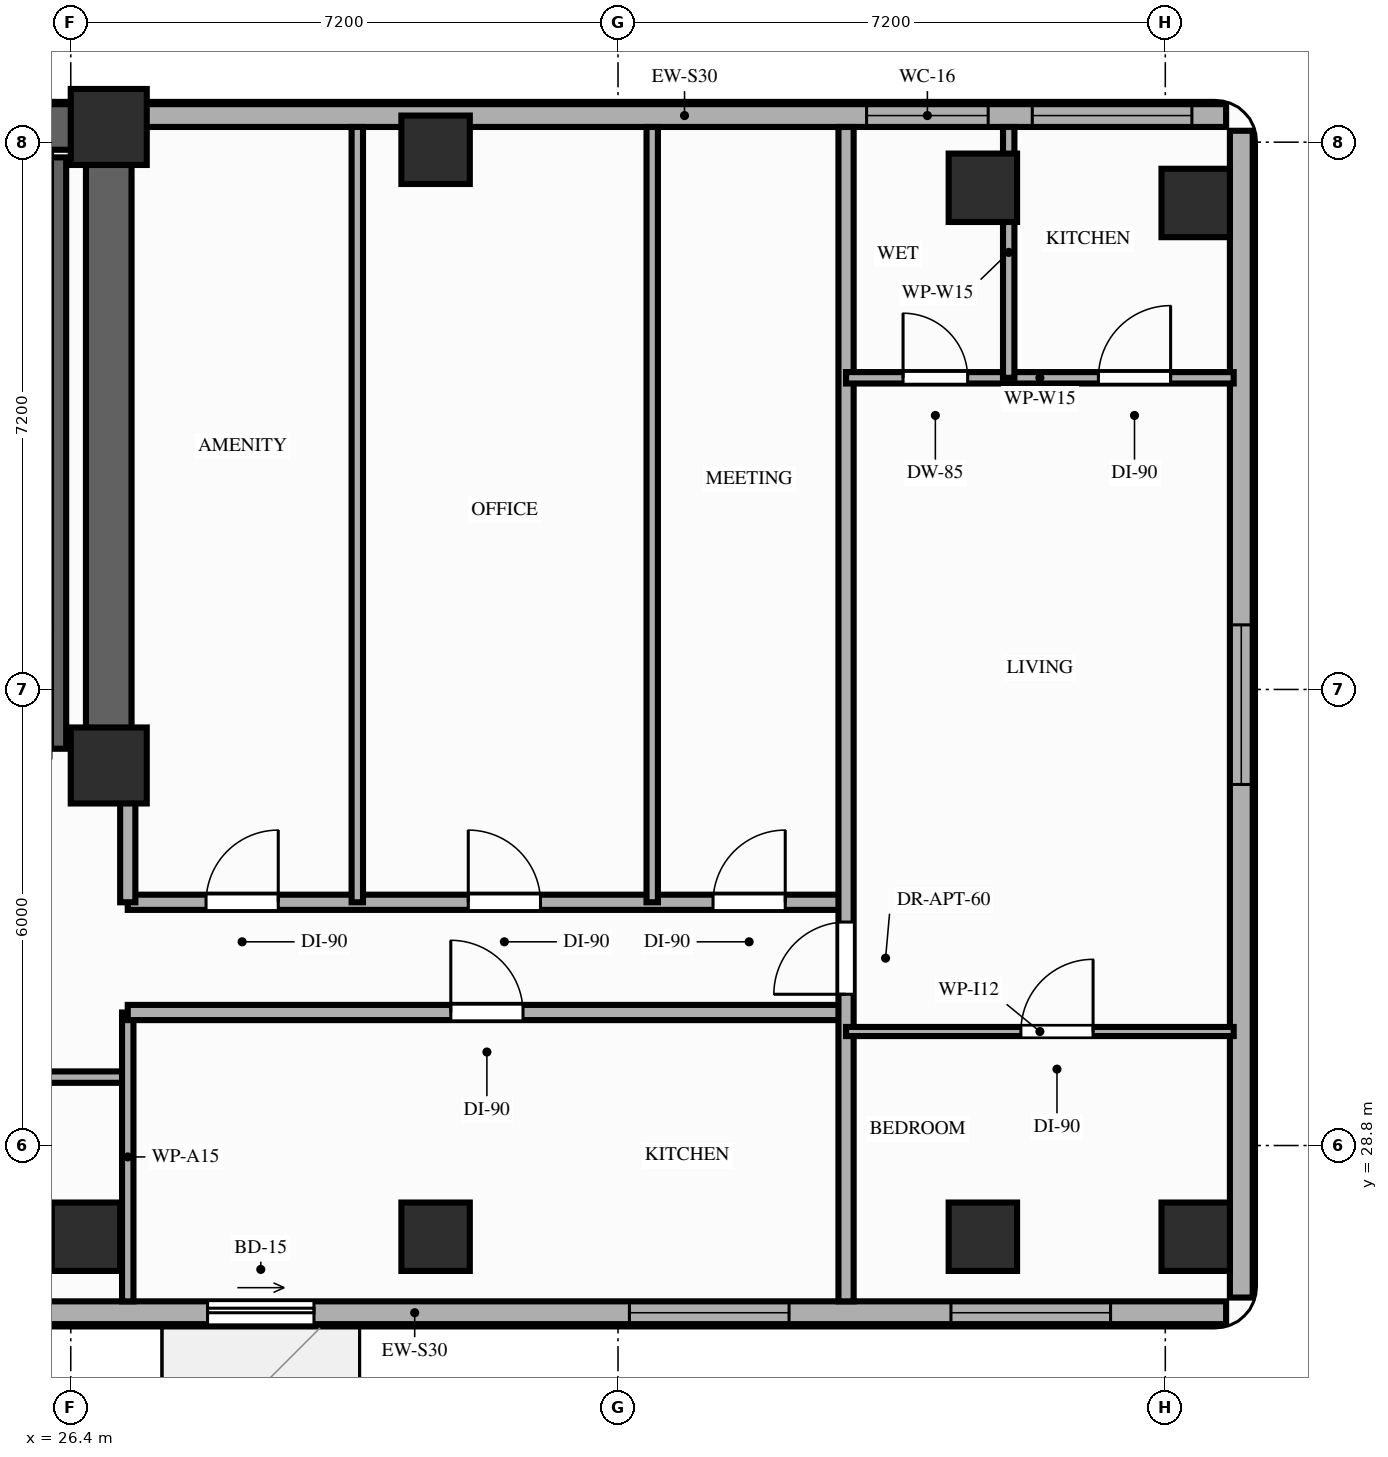
"""IFC4 building model, lengths in metres.
Left out: names, types, materials, properties, quantities, classifications, styles, units other than length and angle.
Written with IfcOpenShell. Run it as: python <this file> out.ifc"""

import sys

from ifc_helpers import new_model, si_unit, direction, frame, frame_2d, origin, origin_2d, place, context, subcontext, project, spatial, rectangle, extrude, element, fill, save


model = new_model("IFC4")
c1 = context("Model", 3, precision=1e-05, world=origin(), true_north=direction((0.0, 1.0)))
c2 = subcontext(c1, "Body", "Model", "MODEL_VIEW")
j1 = project(units=[si_unit("LENGTHUNIT", "METRE"), si_unit("PLANEANGLEUNIT", "RADIAN")], contexts=[c1])
p1 = place(None, origin())
s1 = spatial("IfcSite", under=j1, at=p1, CompositionType="ELEMENT")
p2 = place(p1, origin())
s2 = spatial("IfcBuilding", under=s1, at=p2, CompositionType="ELEMENT")
p3 = place(p2, frame((0.0, 0.0, 179.2)))
s3 = spatial("IfcBuildingStorey", under=s2, at=p3, CompositionType="ELEMENT", Elevation=179.2)
for number, where, z_axis, x_axis in (
    (1, (26.9, 33.8, 0.0), (0.0, 0.0, 1.0), (1.0, 0.0, 0.0)),
    (2, (26.9, 42.2, 0.0), (0.0, 0.0, 1.0), (1.0, 0.0, 0.0)),
):
    element("IfcColumn", number, at=place(p3, frame(where, z_axis=z_axis, x_axis=x_axis)), inside=s3, PredefinedType="COLUMN", context=c2, shape_type="SweptSolid", body=[
        extrude(rectangle(XDim=1.0, YDim=1.0, at=origin_2d()), origin(), (0.0, 0.0, 1.0), 3.2),
    ])
for number, where, z_axis, x_axis in (
    (3, (26.6, 27.6, 0.0), (0.0, 0.0, 1.0), (1.0, 0.0, 0.0)),
    (4, (31.2, 27.6, 0.0), (0.0, 0.0, 1.0), (1.0, 0.0, 0.0)),
    (5, (31.2, 41.9, 0.0), (0.0, 0.0, 1.0), (1.0, 0.0, 0.0)),
    (6, (38.4, 27.6, 0.0), (0.0, 0.0, 1.0), (1.0, 0.0, 0.0)),
    (7, (38.4, 41.4, 0.0), (0.0, 0.0, 1.0), (1.0, 0.0, 0.0)),
    (8, (41.2, 27.6, 0.0), (0.0, 0.0, 1.0), (1.0, 0.0, 0.0)),
    (9, (41.2, 41.2, 0.0), (0.0, 0.0, 1.0), (1.0, 0.0, 0.0)),
):
    element("IfcColumn", number, at=place(p3, frame(where, z_axis=z_axis, x_axis=x_axis)), inside=s3, PredefinedType="COLUMN", context=c2, shape_type="SweptSolid", body=[
        extrude(rectangle(XDim=0.9, YDim=0.9, at=origin_2d()), origin(), (0.0, 0.0, 1.0), 3.2),
    ])
p4 = place(p3, frame((41.6, 42.35, 0.0), z_axis=(0.0, 0.0, 1.0), x_axis=(-1.0, 0.0, 0.0)))
e10 = element("IfcWall", 10, at=p4, inside=s3, PredefinedType="STANDARD", context=c2, shape_type="SweptSolid", body=[
    extrude(rectangle(XDim=14.25, YDim=0.3, at=frame_2d((7.125, 0.0))), origin(), (0.0, 0.0, 1.0), 2.45),
])
p5 = place(p4, frame((3.13, 0.0, 0.85)))
e11 = element("IfcOpeningElement", 11, at=p5, cuts=e10, PredefinedType="OPENING", context=c2, shape_type="SweptSolid", body=[
    extrude(rectangle(XDim=1.6, YDim=1.35, at=frame_2d((0.8, 0.675))), frame((0.0, 0.16, 0.0), z_axis=(0.0, -1.0, 0.0), x_axis=(1.0, 0.0, 0.0)), (0.0, 0.0, 1.0), 0.32),
])
p6 = place(p4, frame((0.45, 0.0, 0.85)))
e12 = element("IfcOpeningElement", 12, at=p6, cuts=e10, PredefinedType="OPENING", context=c2, shape_type="SweptSolid", body=[
    extrude(rectangle(XDim=2.1, YDim=1.35, at=frame_2d((1.05, 0.675))), frame((0.0, 0.16, 0.0), z_axis=(0.0, -1.0, 0.0), x_axis=(1.0, 0.0, 0.0)), (0.0, 0.0, 1.0), 0.32),
])
p7 = place(p3, frame((20.25, 26.6, 0.0), z_axis=(0.0, 0.0, 1.0), x_axis=(1.0, 0.0, 0.0)))
e13 = element("IfcWall", 13, at=p7, inside=s3, PredefinedType="STANDARD", context=c2, shape_type="SweptSolid", body=[
    extrude(rectangle(XDim=21.35, YDim=0.3, at=frame_2d((10.675, 0.0))), origin(), (0.0, 0.0, 1.0), 2.71),
])
p8 = place(p7, frame((7.95, 0.0, 0.0)))
e14 = element("IfcOpeningElement", 14, at=p8, cuts=e13, PredefinedType="OPENING", context=c2, shape_type="SweptSolid", body=[
    extrude(rectangle(XDim=1.4, YDim=2.1, at=frame_2d((0.7, 1.05))), frame((0.0, 0.16, 0.0), z_axis=(0.0, -1.0, 0.0), x_axis=(1.0, 0.0, 0.0)), (0.0, 0.0, 1.0), 0.32),
])
p9 = place(p7, frame((17.73, 0.0, 0.85)))
e15 = element("IfcOpeningElement", 15, at=p9, cuts=e13, PredefinedType="OPENING", context=c2, shape_type="SweptSolid", body=[
    extrude(rectangle(XDim=2.1, YDim=1.61, at=frame_2d((1.05, 0.805))), frame((0.0, 0.16, 0.0), z_axis=(0.0, -1.0, 0.0), x_axis=(1.0, 0.0, 0.0)), (0.0, 0.0, 1.0), 0.32),
])
p10 = place(p7, frame((2.1, 0.0, 0.85)))
e16 = element("IfcOpeningElement", 16, at=p10, cuts=e13, PredefinedType="OPENING", context=c2, shape_type="SweptSolid", body=[
    extrude(rectangle(XDim=2.1, YDim=1.61, at=frame_2d((1.05, 0.805))), frame((0.0, 0.16, 0.0), z_axis=(0.0, -1.0, 0.0), x_axis=(1.0, 0.0, 0.0)), (0.0, 0.0, 1.0), 0.32),
])
p11 = place(p7, frame((13.5, 0.0, 0.85)))
e17 = element("IfcOpeningElement", 17, at=p11, cuts=e13, PredefinedType="OPENING", context=c2, shape_type="SweptSolid", body=[
    extrude(rectangle(XDim=2.1, YDim=1.61, at=frame_2d((1.05, 0.805))), frame((0.0, 0.16, 0.0), z_axis=(0.0, -1.0, 0.0), x_axis=(1.0, 0.0, 0.0)), (0.0, 0.0, 1.0), 0.32),
])
p12 = place(p3, frame((41.8, 26.8, 0.0), z_axis=(0.0, 0.0, 1.0), x_axis=(0.0, 1.0, 0.0)))
e18 = element("IfcWall", 18, at=p12, inside=s3, PredefinedType="STANDARD", context=c2, shape_type="SweptSolid", body=[
    extrude(rectangle(XDim=15.35, YDim=0.3, at=frame_2d((7.675, 0.0))), origin(), (0.0, 0.0, 1.0), 3.02),
])
p13 = place(p12, frame((6.75, 0.0, 0.85)))
e19 = element("IfcOpeningElement", 19, at=p13, cuts=e18, PredefinedType="OPENING", context=c2, shape_type="SweptSolid", body=[
    extrude(rectangle(XDim=2.1, YDim=1.8, at=frame_2d((1.05, 0.9))), frame((0.0, 0.16, 0.0), z_axis=(0.0, -1.0, 0.0), x_axis=(1.0, 0.0, 0.0)), (0.0, 0.0, 1.0), 0.32),
])
p14 = place(p3, frame((6.45, 42.2, 0.0), z_axis=(0.0, 0.0, 1.0), x_axis=(1.0, 0.0, 0.0)))
e20 = element("IfcWall", 20, at=p14, inside=s3, PredefinedType="SHEAR", context=c2, shape_type="SweptSolid", body=[
    extrude(rectangle(XDim=20.45, YDim=0.6, at=frame_2d((10.225, 0.0))), origin(), (0.0, 0.0, 1.0), 3.02),
])
p15 = place(p3, frame((26.9, 33.8, 0.0), z_axis=(0.0, 0.0, 1.0), x_axis=(0.0, 1.0, 0.0)))
e21 = element("IfcWall", 21, at=p15, inside=s3, PredefinedType="SHEAR", context=c2, shape_type="SweptSolid", body=[
    extrude(rectangle(XDim=7.95, YDim=0.6, at=frame_2d((3.975, 0.0))), origin(), (0.0, 0.0, 1.0), 3.02),
])
p16 = place(p3, frame((26.24, 34.02, 0.0), z_axis=(0.0, 0.0, 1.0), x_axis=(0.0, 1.0, 0.0)))
e22 = element("IfcWall", 22, at=p16, inside=s3, PredefinedType="SHEAR", context=c2, shape_type="SweptSolid", body=[
    extrude(rectangle(XDim=7.78, YDim=0.2, at=frame_2d((3.89, 0.0))), origin(), (0.0, 0.0, 1.0), 3.02),
])
p17 = place(p3, frame((20.45, 29.7, 0.0), z_axis=(0.0, 0.0, 1.0), x_axis=(1.0, 0.0, 0.0)))
e23 = element("IfcWall", 23, at=p17, inside=s3, PredefinedType="PARTITIONING", context=c2, shape_type="SweptSolid", body=[
    extrude(rectangle(XDim=6.7, YDim=0.15, at=frame_2d((3.35, 0.0))), origin(), (0.0, 0.0, 1.0), 3.02),
])
p18 = place(p17, frame((2.8, 0.0, 0.0)))
e24 = element("IfcOpeningElement", 24, at=p18, cuts=e23, PredefinedType="OPENING", context=c2, shape_type="SweptSolid", body=[
    extrude(rectangle(XDim=0.95, YDim=2.15, at=frame_2d((0.475, 1.075))), frame((0.0, 0.085, 0.0), z_axis=(0.0, -1.0, 0.0), x_axis=(1.0, 0.0, 0.0)), (0.0, 0.0, 1.0), 0.17),
])
p19 = place(p3, frame((27.15, 26.75, 0.0), z_axis=(0.0, 0.0, 1.0), x_axis=(0.0, 1.0, 0.0)))
e25 = element("IfcWall", 25, at=p19, inside=s3, PredefinedType="PARTITIONING", context=c2, shape_type="SweptSolid", body=[
    extrude(rectangle(XDim=3.8, YDim=0.15, at=frame_2d((1.9, 0.0))), origin(), (0.0, 0.0, 1.0), 2.45),
])
p20 = place(p3, frame((27.15, 30.55, 0.0), z_axis=(0.0, 0.0, 1.0), x_axis=(1.0, 0.0, 0.0)))
e26 = element("IfcWall", 26, at=p20, inside=s3, PredefinedType="PARTITIONING", context=c2, shape_type="SweptSolid", body=[
    extrude(rectangle(XDim=9.45, YDim=0.2, at=frame_2d((4.725, 0.0))), origin(), (0.0, 0.0, 1.0), 2.45),
])
p21 = place(p20, frame((4.25, 0.0, 0.0)))
e27 = element("IfcOpeningElement", 27, at=p21, cuts=e26, PredefinedType="OPENING", context=c2, shape_type="SweptSolid", body=[
    extrude(rectangle(XDim=0.95, YDim=2.15, at=frame_2d((0.475, 1.075))), frame((0.0, 0.11, 0.0), z_axis=(0.0, -1.0, 0.0), x_axis=(1.0, 0.0, 0.0)), (0.0, 0.0, 1.0), 0.22),
])
p22 = place(p3, frame((27.15, 32.0, 0.0), z_axis=(0.0, 0.0, 1.0), x_axis=(1.0, 0.0, 0.0)))
e28 = element("IfcWall", 28, at=p22, inside=s3, PredefinedType="PARTITIONING", context=c2, shape_type="SweptSolid", body=[
    extrude(rectangle(XDim=9.45, YDim=0.2, at=frame_2d((4.725, 0.0))), origin(), (0.0, 0.0, 1.0), 2.45),
])
p23 = place(p22, frame((1.03, 0.0, 0.0)))
e29 = element("IfcOpeningElement", 29, at=p23, cuts=e28, PredefinedType="OPENING", context=c2, shape_type="SweptSolid", body=[
    extrude(rectangle(XDim=0.95, YDim=2.15, at=frame_2d((0.475, 1.075))), frame((0.0, 0.11, 0.0), z_axis=(0.0, -1.0, 0.0), x_axis=(1.0, 0.0, 0.0)), (0.0, 0.0, 1.0), 0.22),
])
p24 = place(p22, frame((4.48, 0.0, 0.0)))
e30 = element("IfcOpeningElement", 30, at=p24, cuts=e28, PredefinedType="OPENING", context=c2, shape_type="SweptSolid", body=[
    extrude(rectangle(XDim=0.95, YDim=2.15, at=frame_2d((0.475, 1.075))), frame((0.0, 0.11, 0.0), z_axis=(0.0, -1.0, 0.0), x_axis=(1.0, 0.0, 0.0)), (0.0, 0.0, 1.0), 0.22),
])
p25 = place(p22, frame((7.7, 0.0, 0.0)))
e31 = element("IfcOpeningElement", 31, at=p25, cuts=e28, PredefinedType="OPENING", context=c2, shape_type="SweptSolid", body=[
    extrude(rectangle(XDim=0.95, YDim=2.15, at=frame_2d((0.475, 1.075))), frame((0.0, 0.11, 0.0), z_axis=(0.0, -1.0, 0.0), x_axis=(1.0, 0.0, 0.0)), (0.0, 0.0, 1.0), 0.22),
])
p26 = place(p3, frame((27.15, 32.0, 0.0), z_axis=(0.0, 0.0, 1.0), x_axis=(0.0, 1.0, 0.0)))
e32 = element("IfcWall", 32, at=p26, inside=s3, PredefinedType="PARTITIONING", context=c2, shape_type="SweptSolid", body=[
    extrude(rectangle(XDim=1.68, YDim=0.2, at=frame_2d((0.84, 0.0))), origin(), (0.0, 0.0, 1.0), 2.45),
])
p27 = place(p3, frame((36.6, 26.75, 0.0), z_axis=(0.0, 0.0, 1.0), x_axis=(0.0, 1.0, 0.0)))
e33 = element("IfcWall", 33, at=p27, inside=s3, PredefinedType="PARTITIONING", context=c2, shape_type="SweptSolid", body=[
    extrude(rectangle(XDim=15.45, YDim=0.2, at=frame_2d((7.725, 0.0))), origin(), (0.0, 0.0, 1.0), 2.45),
])
p28 = place(p27, frame((4.04, 0.0, 0.0)))
e34 = element("IfcOpeningElement", 34, at=p28, cuts=e33, PredefinedType="OPENING", context=c2, shape_type="SweptSolid", body=[
    extrude(rectangle(XDim=0.95, YDim=2.15, at=frame_2d((0.475, 1.075))), frame((0.0, 0.11, 0.0), z_axis=(0.0, -1.0, 0.0), x_axis=(1.0, 0.0, 0.0)), (0.0, 0.0, 1.0), 0.22),
])
p29 = place(p3, frame((36.6, 30.3, 0.0), z_axis=(0.0, 0.0, 1.0), x_axis=(1.0, 0.0, 0.0)))
e35 = element("IfcWall", 35, at=p29, inside=s3, PredefinedType="PARTITIONING", context=c2, shape_type="SweptSolid", body=[
    extrude(rectangle(XDim=5.1, YDim=0.12, at=frame_2d((2.55, 0.0))), origin(), (0.0, 0.0, 1.0), 2.45),
])
p30 = place(p29, frame((2.3, 0.0, 0.0)))
e36 = element("IfcOpeningElement", 36, at=p30, cuts=e35, PredefinedType="OPENING", context=c2, shape_type="SweptSolid", body=[
    extrude(rectangle(XDim=0.95, YDim=2.15, at=frame_2d((0.475, 1.075))), frame((0.0, 0.07, 0.0), z_axis=(0.0, -1.0, 0.0), x_axis=(1.0, 0.0, 0.0)), (0.0, 0.0, 1.0), 0.14),
])
p31 = place(p3, frame((36.6, 38.9, 0.0), z_axis=(0.0, 0.0, 1.0), x_axis=(1.0, 0.0, 0.0)))
e37 = element("IfcWall", 37, at=p31, inside=s3, PredefinedType="PARTITIONING", context=c2, shape_type="SweptSolid", body=[
    extrude(rectangle(XDim=5.1, YDim=0.15, at=frame_2d((2.55, 0.0))), origin(), (0.0, 0.0, 1.0), 2.45),
])
p32 = place(p31, frame((0.75, 0.0, 0.0)))
e38 = element("IfcOpeningElement", 38, at=p32, cuts=e37, PredefinedType="OPENING", context=c2, shape_type="SweptSolid", body=[
    extrude(rectangle(XDim=0.85, YDim=2.1, at=frame_2d((0.425, 1.05))), frame((0.0, 0.085, 0.0), z_axis=(0.0, -1.0, 0.0), x_axis=(1.0, 0.0, 0.0)), (0.0, 0.0, 1.0), 0.17),
])
p33 = place(p31, frame((3.32, 0.0, 0.0)))
e39 = element("IfcOpeningElement", 39, at=p33, cuts=e37, PredefinedType="OPENING", context=c2, shape_type="SweptSolid", body=[
    extrude(rectangle(XDim=0.95, YDim=2.15, at=frame_2d((0.475, 1.075))), frame((0.0, 0.085, 0.0), z_axis=(0.0, -1.0, 0.0), x_axis=(1.0, 0.0, 0.0)), (0.0, 0.0, 1.0), 0.17),
])
p34 = place(p3, frame((38.74, 38.9, 0.0), z_axis=(0.0, 0.0, 1.0), x_axis=(0.0, 1.0, 0.0)))
e40 = element("IfcWall", 40, at=p34, inside=s3, PredefinedType="PARTITIONING", context=c2, shape_type="SweptSolid", body=[
    extrude(rectangle(XDim=3.3, YDim=0.15, at=frame_2d((1.65, 0.0))), origin(), (0.0, 0.0, 1.0), 2.45),
])
for number, where, z_axis, x_axis in (
    (41, (30.17, 32.0, 0.0), (0.0, 0.0, 1.0), (0.0, 1.0, 0.0)),
    (42, (34.05, 32.0, 0.0), (0.0, 0.0, 1.0), (0.0, 1.0, 0.0)),
):
    element("IfcWall", number, at=place(p3, frame(where, z_axis=z_axis, x_axis=x_axis)), inside=s3, PredefinedType="PARTITIONING", context=c2, shape_type="SweptSolid", body=[
        extrude(rectangle(XDim=10.2, YDim=0.15, at=frame_2d((5.1, 0.0))), origin(), (0.0, 0.0, 1.0), 2.45),
    ])
p35 = place(p8, origin())
e43 = element("IfcDoor", 43, at=p35, inside=s3, OperationType="SLIDING_TO_RIGHT", PredefinedType="DOOR", context=c2, shape_type="SweptSolid", body=[
    extrude(rectangle(XDim=1.4, YDim=2.1, at=frame_2d((0.7, 1.05))), frame((0.0, 0.025, 0.0), z_axis=(0.0, -1.0, 0.0), x_axis=(1.0, 0.0, 0.0)), (0.0, 0.0, 1.0), 0.05),
])
fill(e14, e43)
p36 = place(p13, origin())
e44 = element("IfcWindow", 44, at=p36, inside=s3, PartitioningType="SINGLE_PANEL", PredefinedType="WINDOW", context=c2, shape_type="SweptSolid", body=[
    extrude(rectangle(XDim=2.1, YDim=1.8, at=frame_2d((1.05, 0.9))), frame((0.0, 0.03, 0.0), z_axis=(0.0, -1.0, 0.0), x_axis=(1.0, 0.0, 0.0)), (0.0, 0.0, 1.0), 0.06),
])
fill(e19, e44)
p37 = place(p9, origin())
e45 = element("IfcWindow", 45, at=p37, inside=s3, PartitioningType="SINGLE_PANEL", PredefinedType="WINDOW", context=c2, shape_type="SweptSolid", body=[
    extrude(rectangle(XDim=2.1, YDim=1.61, at=frame_2d((1.05, 0.805))), frame((0.0, 0.03, 0.0), z_axis=(0.0, -1.0, 0.0), x_axis=(1.0, 0.0, 0.0)), (0.0, 0.0, 1.0), 0.06),
])
fill(e15, e45)
p38 = place(p5, origin())
e46 = element("IfcWindow", 46, at=p38, inside=s3, PartitioningType="SINGLE_PANEL", PredefinedType="WINDOW", context=c2, shape_type="SweptSolid", body=[
    extrude(rectangle(XDim=1.6, YDim=1.35, at=frame_2d((0.8, 0.675))), frame((0.0, 0.03, 0.0), z_axis=(0.0, -1.0, 0.0), x_axis=(1.0, 0.0, 0.0)), (0.0, 0.0, 1.0), 0.06),
])
fill(e11, e46)
p39 = place(p6, origin())
e47 = element("IfcWindow", 47, at=p39, inside=s3, PartitioningType="SINGLE_PANEL", PredefinedType="WINDOW", context=c2, shape_type="SweptSolid", body=[
    extrude(rectangle(XDim=2.1, YDim=1.35, at=frame_2d((1.05, 0.675))), frame((0.0, 0.03, 0.0), z_axis=(0.0, -1.0, 0.0), x_axis=(1.0, 0.0, 0.0)), (0.0, 0.0, 1.0), 0.06),
])
fill(e12, e47)
p40 = place(p11, origin())
e48 = element("IfcWindow", 48, at=p40, inside=s3, PartitioningType="SINGLE_PANEL", PredefinedType="WINDOW", context=c2, shape_type="SweptSolid", body=[
    extrude(rectangle(XDim=2.1, YDim=1.61, at=frame_2d((1.05, 0.805))), frame((0.0, 0.03, 0.0), z_axis=(0.0, -1.0, 0.0), x_axis=(1.0, 0.0, 0.0)), (0.0, 0.0, 1.0), 0.06),
])
fill(e17, e48)
p41 = place(p28, origin())
e49 = element("IfcDoor", 49, at=p41, inside=s3, OperationType="SINGLE_SWING_LEFT", PredefinedType="DOOR", context=c2, shape_type="SweptSolid", body=[
    extrude(rectangle(XDim=0.95, YDim=2.15, at=frame_2d((0.475, 1.075))), frame((0.0, 0.025, 0.0), z_axis=(0.0, -1.0, 0.0), x_axis=(1.0, 0.0, 0.0)), (0.0, 0.0, 1.0), 0.05),
])
fill(e34, e49)
p42 = place(p30, origin())
e50 = element("IfcDoor", 50, at=p42, inside=s3, OperationType="SINGLE_SWING_RIGHT", PredefinedType="DOOR", context=c2, shape_type="SweptSolid", body=[
    extrude(rectangle(XDim=0.95, YDim=2.15, at=frame_2d((0.475, 1.075))), frame((0.0, 0.025, 0.0), z_axis=(0.0, -1.0, 0.0), x_axis=(1.0, 0.0, 0.0)), (0.0, 0.0, 1.0), 0.05),
])
fill(e36, e50)
p43 = place(p32, origin())
e51 = element("IfcDoor", 51, at=p43, inside=s3, OperationType="SINGLE_SWING_LEFT", PredefinedType="DOOR", context=c2, shape_type="SweptSolid", body=[
    extrude(rectangle(XDim=0.85, YDim=2.1, at=frame_2d((0.425, 1.05))), frame((0.0, 0.025, 0.0), z_axis=(0.0, -1.0, 0.0), x_axis=(1.0, 0.0, 0.0)), (0.0, 0.0, 1.0), 0.05),
])
fill(e38, e51)
p44 = place(p33, origin())
e52 = element("IfcDoor", 52, at=p44, inside=s3, OperationType="SINGLE_SWING_RIGHT", PredefinedType="DOOR", context=c2, shape_type="SweptSolid", body=[
    extrude(rectangle(XDim=0.95, YDim=2.15, at=frame_2d((0.475, 1.075))), frame((0.0, 0.025, 0.0), z_axis=(0.0, -1.0, 0.0), x_axis=(1.0, 0.0, 0.0)), (0.0, 0.0, 1.0), 0.05),
])
fill(e39, e52)
p45 = place(p21, origin())
e53 = element("IfcDoor", 53, at=p45, inside=s3, OperationType="SINGLE_SWING_LEFT", PredefinedType="DOOR", context=c2, shape_type="SweptSolid", body=[
    extrude(rectangle(XDim=0.95, YDim=2.15, at=frame_2d((0.475, 1.075))), frame((0.0, 0.025, 0.0), z_axis=(0.0, -1.0, 0.0), x_axis=(1.0, 0.0, 0.0)), (0.0, 0.0, 1.0), 0.05),
])
fill(e27, e53)
p46 = place(p23, origin())
e54 = element("IfcDoor", 54, at=p46, inside=s3, OperationType="SINGLE_SWING_RIGHT", PredefinedType="DOOR", context=c2, shape_type="SweptSolid", body=[
    extrude(rectangle(XDim=0.95, YDim=2.15, at=frame_2d((0.475, 1.075))), frame((0.0, 0.025, 0.0), z_axis=(0.0, -1.0, 0.0), x_axis=(1.0, 0.0, 0.0)), (0.0, 0.0, 1.0), 0.05),
])
fill(e29, e54)
p47 = place(p24, origin())
e55 = element("IfcDoor", 55, at=p47, inside=s3, OperationType="SINGLE_SWING_LEFT", PredefinedType="DOOR", context=c2, shape_type="SweptSolid", body=[
    extrude(rectangle(XDim=0.95, YDim=2.15, at=frame_2d((0.475, 1.075))), frame((0.0, 0.025, 0.0), z_axis=(0.0, -1.0, 0.0), x_axis=(1.0, 0.0, 0.0)), (0.0, 0.0, 1.0), 0.05),
])
fill(e30, e55)
p48 = place(p25, origin())
e56 = element("IfcDoor", 56, at=p48, inside=s3, OperationType="SINGLE_SWING_RIGHT", PredefinedType="DOOR", context=c2, shape_type="SweptSolid", body=[
    extrude(rectangle(XDim=0.95, YDim=2.15, at=frame_2d((0.475, 1.075))), frame((0.0, 0.025, 0.0), z_axis=(0.0, -1.0, 0.0), x_axis=(1.0, 0.0, 0.0)), (0.0, 0.0, 1.0), 0.05),
])
fill(e31, e56)
save(model, sys.argv[1])
